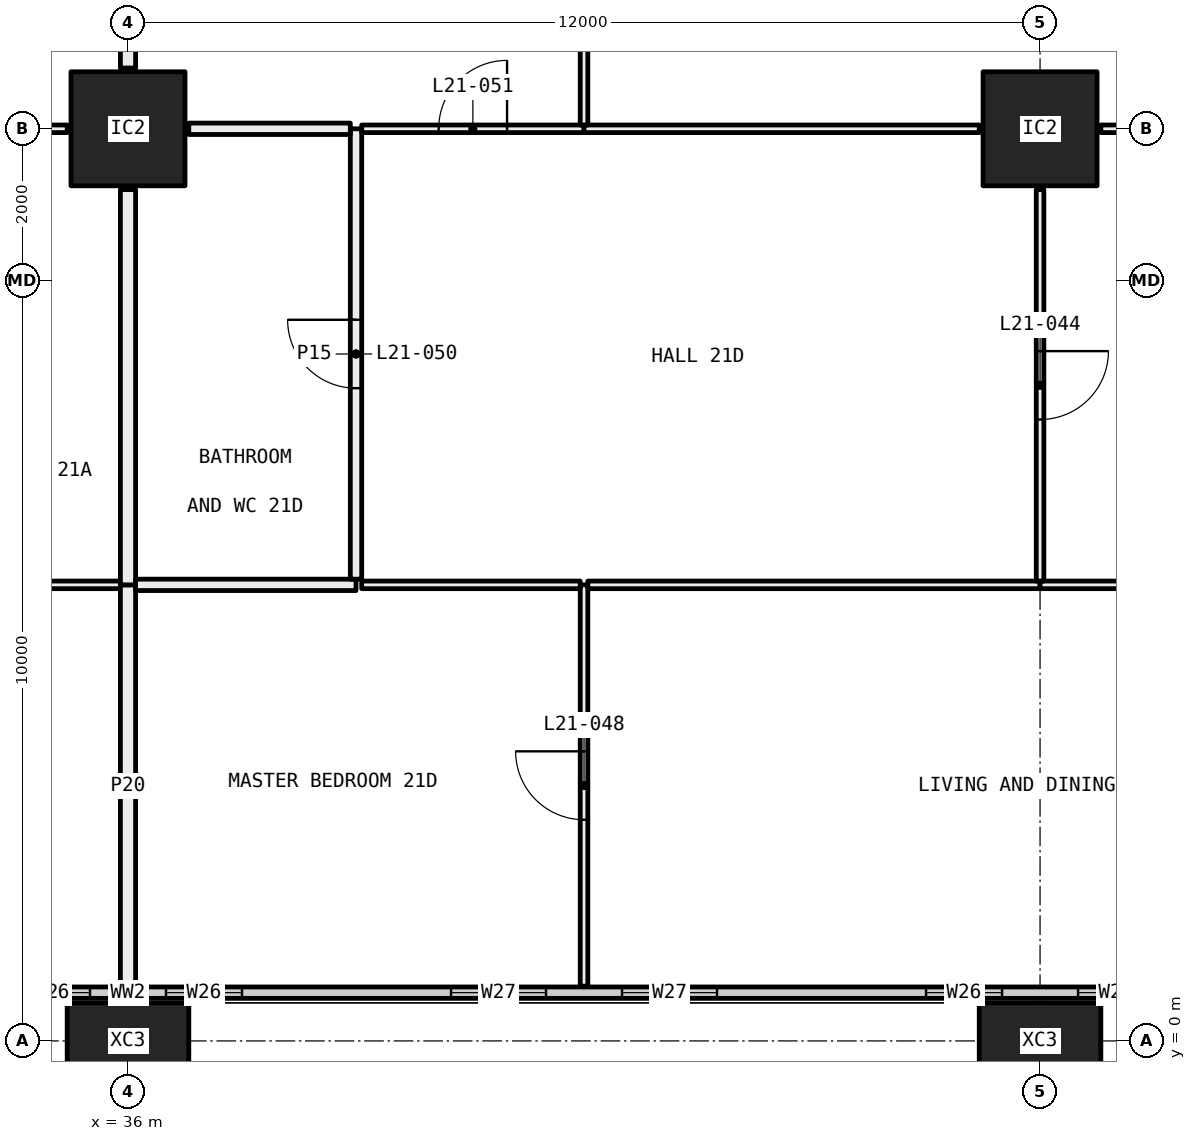
"""IFC4 building model, lengths in metres.
Left out: names, types, materials, properties, quantities, classifications, styles, units other than length and angle.
Written with IfcOpenShell. Run it as: python <this file> out.ifc"""

import sys

from ifc_helpers import new_model, si_unit, direction, frame, frame_2d, origin, origin_2d, place, context, subcontext, project, spatial, rectangle, hollow_rectangle, extrude, element, fill, save


model = new_model("IFC4")
c1 = context("Model", 3, precision=1e-05, world=origin(), true_north=direction((0.0, 1.0)))
c2 = subcontext(c1, "Body", "Model", "MODEL_VIEW")
j1 = project(units=[si_unit("LENGTHUNIT", "METRE"), si_unit("PLANEANGLEUNIT", "RADIAN")], contexts=[c1])
p1 = place(None, origin())
s1 = spatial("IfcSite", under=j1, at=p1, CompositionType="ELEMENT")
p2 = place(p1, origin())
s2 = spatial("IfcBuilding", under=s1, at=p2, CompositionType="ELEMENT")
p3 = place(p2, frame((0.0, 0.0, 85.2)))
s3 = spatial("IfcBuildingStorey", under=s2, at=p3, CompositionType="ELEMENT", Elevation=85.2)
p4 = place(p3, frame((36.0, 0.0, -0.4), z_axis=(0.0, 0.0, 1.0), x_axis=(1.0, 0.0, 0.0)))
e1 = element("IfcColumn", 1, at=p4, inside=s3, PredefinedType="COLUMN", context=c2, shape_type="SweptSolid", body=[
    extrude(hollow_rectangle(XDim=1.6, YDim=1.0, WallThickness=0.065, at=origin_2d()), origin(), (0.0, 0.0, 1.0), 3.45),
])
p5 = place(p3, frame((36.0, 12.0, 0.0), z_axis=(0.0, 0.0, 1.0), x_axis=(1.0, 0.0, 0.0)))
e2 = element("IfcColumn", 2, at=p5, inside=s3, PredefinedType="COLUMN", context=c2, shape_type="SweptSolid", body=[
    extrude(hollow_rectangle(XDim=1.5, YDim=1.5, WallThickness=0.065, at=origin_2d()), origin(), (0.0, 0.0, 1.0), 3.05),
])
p6 = place(p3, frame((48.0, 0.0, -0.4), z_axis=(0.0, 0.0, 1.0), x_axis=(1.0, 0.0, 0.0)))
e3 = element("IfcColumn", 3, at=p6, inside=s3, PredefinedType="COLUMN", context=c2, shape_type="SweptSolid", body=[
    extrude(hollow_rectangle(XDim=1.6, YDim=1.0, WallThickness=0.065, at=origin_2d()), origin(), (0.0, 0.0, 1.0), 3.45),
])
p7 = place(p3, frame((48.0, 12.0, 0.0), z_axis=(0.0, 0.0, 1.0), x_axis=(1.0, 0.0, 0.0)))
e4 = element("IfcColumn", 4, at=p7, inside=s3, PredefinedType="COLUMN", context=c2, shape_type="SweptSolid", body=[
    extrude(hollow_rectangle(XDim=1.5, YDim=1.5, WallThickness=0.065, at=origin_2d()), origin(), (0.0, 0.0, 1.0), 3.05),
])
p8 = place(p3, frame((6.56, 0.635, 0.0), z_axis=(0.0, 0.0, 1.0), x_axis=(1.0, 0.0, 0.0)))
e5 = element("IfcWall", 5, at=p8, inside=s3, PredefinedType="ELEMENTEDWALL", context=c2, shape_type="SweptSolid", body=[
    extrude(rectangle(XDim=58.88, YDim=0.15, at=frame_2d((29.44, 0.0))), origin(), (0.0, 0.0, 1.0), 3.05),
])
p9 = place(p8, frame((0.44, 0.0, 0.45)))
e6 = element("IfcOpeningElement", 6, at=p9, cuts=e5, PredefinedType="OPENING", context=c2, shape_type="SweptSolid", body=[
    extrude(rectangle(XDim=4.5, YDim=2.55, at=frame_2d((2.25, 1.275))), frame((0.0, 0.085, 0.0), z_axis=(0.0, -1.0, 0.0), x_axis=(1.0, 0.0, 0.0)), (0.0, 0.0, 1.0), 0.17),
])
p10 = place(p8, frame((5.94, 0.0, 0.45)))
e7 = element("IfcOpeningElement", 7, at=p10, cuts=e5, PredefinedType="OPENING", context=c2, shape_type="SweptSolid", body=[
    extrude(rectangle(XDim=1.0, YDim=2.55, at=frame_2d((0.5, 1.275))), frame((0.0, 0.085, 0.0), z_axis=(0.0, -1.0, 0.0), x_axis=(1.0, 0.0, 0.0)), (0.0, 0.0, 1.0), 0.17),
])
p11 = place(p8, frame((9.69, 0.0, 0.45)))
e8 = element("IfcOpeningElement", 8, at=p11, cuts=e5, PredefinedType="OPENING", context=c2, shape_type="SweptSolid", body=[
    extrude(rectangle(XDim=1.25, YDim=2.55, at=frame_2d((0.625, 1.275))), frame((0.0, 0.085, 0.0), z_axis=(0.0, -1.0, 0.0), x_axis=(1.0, 0.0, 0.0)), (0.0, 0.0, 1.0), 0.17),
])
p12 = place(p8, frame((11.94, 0.0, 0.45)))
e9 = element("IfcOpeningElement", 9, at=p12, cuts=e5, PredefinedType="OPENING", context=c2, shape_type="SweptSolid", body=[
    extrude(rectangle(XDim=1.25, YDim=2.55, at=frame_2d((0.625, 1.275))), frame((0.0, 0.085, 0.0), z_axis=(0.0, -1.0, 0.0), x_axis=(1.0, 0.0, 0.0)), (0.0, 0.0, 1.0), 0.17),
])
p13 = place(p8, frame((15.94, 0.0, 0.45)))
e10 = element("IfcOpeningElement", 10, at=p13, cuts=e5, PredefinedType="OPENING", context=c2, shape_type="SweptSolid", body=[
    extrude(rectangle(XDim=1.0, YDim=2.55, at=frame_2d((0.5, 1.275))), frame((0.0, 0.085, 0.0), z_axis=(0.0, -1.0, 0.0), x_axis=(1.0, 0.0, 0.0)), (0.0, 0.0, 1.0), 0.17),
])
p14 = place(p8, frame((17.94, 0.0, 0.45)))
e11 = element("IfcOpeningElement", 11, at=p14, cuts=e5, PredefinedType="OPENING", context=c2, shape_type="SweptSolid", body=[
    extrude(rectangle(XDim=1.0, YDim=2.55, at=frame_2d((0.5, 1.275))), frame((0.0, 0.085, 0.0), z_axis=(0.0, -1.0, 0.0), x_axis=(1.0, 0.0, 0.0)), (0.0, 0.0, 1.0), 0.17),
])
p15 = place(p8, frame((21.69, 0.0, 0.45)))
e12 = element("IfcOpeningElement", 12, at=p15, cuts=e5, PredefinedType="OPENING", context=c2, shape_type="SweptSolid", body=[
    extrude(rectangle(XDim=1.25, YDim=2.55, at=frame_2d((0.625, 1.275))), frame((0.0, 0.085, 0.0), z_axis=(0.0, -1.0, 0.0), x_axis=(1.0, 0.0, 0.0)), (0.0, 0.0, 1.0), 0.17),
])
p16 = place(p8, frame((23.94, 0.0, 0.45)))
e13 = element("IfcOpeningElement", 13, at=p16, cuts=e5, PredefinedType="OPENING", context=c2, shape_type="SweptSolid", body=[
    extrude(rectangle(XDim=1.25, YDim=2.55, at=frame_2d((0.625, 1.275))), frame((0.0, 0.085, 0.0), z_axis=(0.0, -1.0, 0.0), x_axis=(1.0, 0.0, 0.0)), (0.0, 0.0, 1.0), 0.17),
])
p17 = place(p8, frame((27.94, 0.0, 0.45)))
e14 = element("IfcOpeningElement", 14, at=p17, cuts=e5, PredefinedType="OPENING", context=c2, shape_type="SweptSolid", body=[
    extrude(rectangle(XDim=1.0, YDim=2.55, at=frame_2d((0.5, 1.275))), frame((0.0, 0.085, 0.0), z_axis=(0.0, -1.0, 0.0), x_axis=(1.0, 0.0, 0.0)), (0.0, 0.0, 1.0), 0.17),
])
p18 = place(p8, frame((29.94, 0.0, 0.45)))
e15 = element("IfcOpeningElement", 15, at=p18, cuts=e5, PredefinedType="OPENING", context=c2, shape_type="SweptSolid", body=[
    extrude(rectangle(XDim=1.0, YDim=2.55, at=frame_2d((0.5, 1.275))), frame((0.0, 0.085, 0.0), z_axis=(0.0, -1.0, 0.0), x_axis=(1.0, 0.0, 0.0)), (0.0, 0.0, 1.0), 0.17),
])
p19 = place(p8, frame((33.69, 0.0, 0.45)))
e16 = element("IfcOpeningElement", 16, at=p19, cuts=e5, PredefinedType="OPENING", context=c2, shape_type="SweptSolid", body=[
    extrude(rectangle(XDim=1.25, YDim=2.55, at=frame_2d((0.625, 1.275))), frame((0.0, 0.085, 0.0), z_axis=(0.0, -1.0, 0.0), x_axis=(1.0, 0.0, 0.0)), (0.0, 0.0, 1.0), 0.17),
])
p20 = place(p8, frame((35.94, 0.0, 0.45)))
e17 = element("IfcOpeningElement", 17, at=p20, cuts=e5, PredefinedType="OPENING", context=c2, shape_type="SweptSolid", body=[
    extrude(rectangle(XDim=1.25, YDim=2.55, at=frame_2d((0.625, 1.275))), frame((0.0, 0.085, 0.0), z_axis=(0.0, -1.0, 0.0), x_axis=(1.0, 0.0, 0.0)), (0.0, 0.0, 1.0), 0.17),
])
p21 = place(p8, frame((39.94, 0.0, 0.45)))
e18 = element("IfcOpeningElement", 18, at=p21, cuts=e5, PredefinedType="OPENING", context=c2, shape_type="SweptSolid", body=[
    extrude(rectangle(XDim=1.0, YDim=2.55, at=frame_2d((0.5, 1.275))), frame((0.0, 0.085, 0.0), z_axis=(0.0, -1.0, 0.0), x_axis=(1.0, 0.0, 0.0)), (0.0, 0.0, 1.0), 0.17),
])
p22 = place(p8, frame((41.94, 0.0, 0.45)))
e19 = element("IfcOpeningElement", 19, at=p22, cuts=e5, PredefinedType="OPENING", context=c2, shape_type="SweptSolid", body=[
    extrude(rectangle(XDim=1.0, YDim=2.55, at=frame_2d((0.5, 1.275))), frame((0.0, 0.085, 0.0), z_axis=(0.0, -1.0, 0.0), x_axis=(1.0, 0.0, 0.0)), (0.0, 0.0, 1.0), 0.17),
])
p23 = place(p8, frame((45.69, 0.0, 0.45)))
e20 = element("IfcOpeningElement", 20, at=p23, cuts=e5, PredefinedType="OPENING", context=c2, shape_type="SweptSolid", body=[
    extrude(rectangle(XDim=1.25, YDim=2.55, at=frame_2d((0.625, 1.275))), frame((0.0, 0.085, 0.0), z_axis=(0.0, -1.0, 0.0), x_axis=(1.0, 0.0, 0.0)), (0.0, 0.0, 1.0), 0.17),
])
p24 = place(p8, frame((47.94, 0.0, 0.45)))
e21 = element("IfcOpeningElement", 21, at=p24, cuts=e5, PredefinedType="OPENING", context=c2, shape_type="SweptSolid", body=[
    extrude(rectangle(XDim=1.25, YDim=2.55, at=frame_2d((0.625, 1.275))), frame((0.0, 0.085, 0.0), z_axis=(0.0, -1.0, 0.0), x_axis=(1.0, 0.0, 0.0)), (0.0, 0.0, 1.0), 0.17),
])
p25 = place(p8, frame((51.94, 0.0, 0.45)))
e22 = element("IfcOpeningElement", 22, at=p25, cuts=e5, PredefinedType="OPENING", context=c2, shape_type="SweptSolid", body=[
    extrude(rectangle(XDim=1.0, YDim=2.55, at=frame_2d((0.5, 1.275))), frame((0.0, 0.085, 0.0), z_axis=(0.0, -1.0, 0.0), x_axis=(1.0, 0.0, 0.0)), (0.0, 0.0, 1.0), 0.17),
])
p26 = place(p8, frame((53.94, 0.0, 0.45)))
e23 = element("IfcOpeningElement", 23, at=p26, cuts=e5, PredefinedType="OPENING", context=c2, shape_type="SweptSolid", body=[
    extrude(rectangle(XDim=4.5, YDim=2.55, at=frame_2d((2.25, 1.275))), frame((0.0, 0.085, 0.0), z_axis=(0.0, -1.0, 0.0), x_axis=(1.0, 0.0, 0.0)), (0.0, 0.0, 1.0), 0.17),
])
p27 = place(p3, frame((35.9, 6.0, 0.0), z_axis=(0.0, 0.0, 1.0), x_axis=(-1.0, 0.0, 0.0)))
e24 = element("IfcWall", 24, at=p27, inside=s3, PredefinedType="PARTITIONING", context=c2, shape_type="SweptSolid", body=[
    extrude(rectangle(XDim=2.9, YDim=0.1, at=frame_2d((1.45, 0.0))), origin(), (0.0, 0.0, 1.0), 3.05),
])
p28 = place(p3, frame((36.0, 0.72, 0.0), z_axis=(0.0, 0.0, 1.0), x_axis=(0.0, 1.0, 0.0)))
e25 = element("IfcWall", 25, at=p28, inside=s3, PredefinedType="PARTITIONING", context=c2, shape_type="SweptSolid", body=[
    extrude(rectangle(XDim=5.28, YDim=0.2, at=frame_2d((2.64, 0.0))), origin(), (0.0, 0.0, 1.0), 2.45),
])
p29 = place(p3, frame((35.2, 12.0, 0.0), z_axis=(0.0, 0.0, 1.0), x_axis=(-1.0, 0.0, 0.0)))
e26 = element("IfcWall", 26, at=p29, inside=s3, PredefinedType="PARTITIONING", context=c2, shape_type="SweptSolid", body=[
    extrude(rectangle(XDim=2.15, YDim=0.1, at=frame_2d((1.075, 0.0))), origin(), (0.0, 0.0, 1.0), 2.45),
])
for number, where, z_axis, x_axis in (
    (27, (36.0, 6.0, 0.0), (0.0, 0.0, 1.0), (0.0, 1.0, 0.0)),
    (28, (36.0, 12.8, 0.0), (0.0, 0.0, 1.0), (0.0, 1.0, 0.0)),
):
    element("IfcWall", number, at=place(p3, frame(where, z_axis=z_axis, x_axis=x_axis)), inside=s3, PredefinedType="PARTITIONING", context=c2, shape_type="SweptSolid", body=[
        extrude(rectangle(XDim=5.2, YDim=0.2, at=frame_2d((2.6, 0.0))), origin(), (0.0, 0.0, 1.0), 2.45),
    ])
p30 = place(p3, frame((42.0, 0.72, 0.0), z_axis=(0.0, 0.0, 1.0), x_axis=(0.0, 1.0, 0.0)))
e29 = element("IfcWall", 29, at=p30, inside=s3, PredefinedType="PARTITIONING", context=c2, shape_type="SweptSolid", body=[
    extrude(rectangle(XDim=5.28, YDim=0.1, at=frame_2d((2.64, 0.0))), origin(), (0.0, 0.0, 1.0), 3.05),
])
p31 = place(p30, frame((2.19, 0.0, 0.0)))
e30 = element("IfcOpeningElement", 30, at=p31, cuts=e29, PredefinedType="OPENING", context=c2, shape_type="SweptSolid", body=[
    extrude(rectangle(XDim=0.9, YDim=2.1, at=frame_2d((0.45, 1.05))), frame((0.0, 0.06, 0.0), z_axis=(0.0, -1.0, 0.0), x_axis=(1.0, 0.0, 0.0)), (0.0, 0.0, 1.0), 0.12),
])
p32 = place(p3, frame((39.0, 6.0, 0.0), z_axis=(0.0, 0.0, 1.0), x_axis=(-1.0, 0.0, 0.0)))
e31 = element("IfcWall", 31, at=p32, inside=s3, PredefinedType="PARTITIONING", context=c2, shape_type="SweptSolid", body=[
    extrude(rectangle(XDim=2.9, YDim=0.15, at=frame_2d((1.45, 0.0))), origin(), (0.0, 0.0, 1.0), 3.05),
])
p33 = place(p3, frame((41.95, 6.0, 0.0), z_axis=(0.0, 0.0, 1.0), x_axis=(-1.0, 0.0, 0.0)))
e32 = element("IfcWall", 32, at=p33, inside=s3, PredefinedType="PARTITIONING", context=c2, shape_type="SweptSolid", body=[
    extrude(rectangle(XDim=2.875, YDim=0.1, at=frame_2d((1.438, 0.0))), origin(), (0.0, 0.0, 1.0), 3.05),
])
p34 = place(p3, frame((48.0, 6.0, 0.0), z_axis=(0.0, 0.0, 1.0), x_axis=(-1.0, 0.0, 0.0)))
e33 = element("IfcWall", 33, at=p34, inside=s3, PredefinedType="PARTITIONING", context=c2, shape_type="SweptSolid", body=[
    extrude(rectangle(XDim=5.95, YDim=0.1, at=frame_2d((2.975, 0.0))), origin(), (0.0, 0.0, 1.0), 2.45),
])
p35 = place(p3, frame((53.95, 6.0, 0.0), z_axis=(0.0, 0.0, 1.0), x_axis=(-1.0, 0.0, 0.0)))
e34 = element("IfcWall", 34, at=p35, inside=s3, PredefinedType="PARTITIONING", context=c2, shape_type="SweptSolid", body=[
    extrude(rectangle(XDim=5.95, YDim=0.1, at=frame_2d((2.975, 0.0))), origin(), (0.0, 0.0, 1.0), 2.45),
])
p36 = place(p35, frame((2.525, 0.0, 0.0)))
e35 = element("IfcOpeningElement", 35, at=p36, cuts=e34, PredefinedType="OPENING", context=c2, shape_type="SweptSolid", body=[
    extrude(rectangle(XDim=0.9, YDim=2.1, at=frame_2d((0.45, 1.05))), frame((0.0, 0.06, 0.0), z_axis=(0.0, -1.0, 0.0), x_axis=(1.0, 0.0, 0.0)), (0.0, 0.0, 1.0), 0.12),
])
p37 = place(p3, frame((39.0, 6.075, 0.0), z_axis=(0.0, 0.0, 1.0), x_axis=(0.0, 1.0, 0.0)))
e36 = element("IfcWall", 36, at=p37, inside=s3, PredefinedType="PARTITIONING", context=c2, shape_type="SweptSolid", body=[
    extrude(rectangle(XDim=5.925, YDim=0.15, at=frame_2d((2.962, 0.0))), origin(), (0.0, 0.0, 1.0), 2.45),
])
p38 = place(p37, frame((2.512, 0.0, 0.0)))
e37 = element("IfcOpeningElement", 37, at=p38, cuts=e36, PredefinedType="OPENING", context=c2, shape_type="SweptSolid", body=[
    extrude(rectangle(XDim=0.9, YDim=2.1, at=frame_2d((0.45, 1.05))), frame((0.0, 0.085, 0.0), z_axis=(0.0, -1.0, 0.0), x_axis=(1.0, 0.0, 0.0)), (0.0, 0.0, 1.0), 0.17),
])
p39 = place(p3, frame((38.925, 12.0, 0.0), z_axis=(0.0, 0.0, 1.0), x_axis=(-1.0, 0.0, 0.0)))
e38 = element("IfcWall", 38, at=p39, inside=s3, PredefinedType="PARTITIONING", context=c2, shape_type="SweptSolid", body=[
    extrude(rectangle(XDim=2.125, YDim=0.15, at=frame_2d((1.062, 0.0))), origin(), (0.0, 0.0, 1.0), 2.45),
])
p40 = place(p3, frame((48.0, 6.05, 0.0), z_axis=(0.0, 0.0, 1.0), x_axis=(0.0, 1.0, 0.0)))
e39 = element("IfcWall", 39, at=p40, inside=s3, PredefinedType="PARTITIONING", context=c2, shape_type="SweptSolid", body=[
    extrude(rectangle(XDim=5.15, YDim=0.1, at=frame_2d((2.575, 0.0))), origin(), (0.0, 0.0, 1.0), 2.45),
])
p41 = place(p40, frame((2.125, 0.0, 0.0)))
e40 = element("IfcOpeningElement", 40, at=p41, cuts=e39, PredefinedType="OPENING", context=c2, shape_type="SweptSolid", body=[
    extrude(rectangle(XDim=0.9, YDim=2.1, at=frame_2d((0.45, 1.05))), frame((0.0, 0.06, 0.0), z_axis=(0.0, -1.0, 0.0), x_axis=(1.0, 0.0, 0.0)), (0.0, 0.0, 1.0), 0.12),
])
p42 = place(p3, frame((42.0, 12.0, 0.0), z_axis=(0.0, 0.0, 1.0), x_axis=(-1.0, 0.0, 0.0)))
e41 = element("IfcWall", 41, at=p42, inside=s3, PredefinedType="PARTITIONING", context=c2, shape_type="SweptSolid", body=[
    extrude(rectangle(XDim=2.925, YDim=0.1, at=frame_2d((1.462, 0.0))), origin(), (0.0, 0.0, 1.0), 2.45),
])
p43 = place(p42, frame((1.012, 0.0, 0.0)))
e42 = element("IfcOpeningElement", 42, at=p43, cuts=e41, PredefinedType="OPENING", context=c2, shape_type="SweptSolid", body=[
    extrude(rectangle(XDim=0.9, YDim=2.1, at=frame_2d((0.45, 1.05))), frame((0.0, 0.06, 0.0), z_axis=(0.0, -1.0, 0.0), x_axis=(1.0, 0.0, 0.0)), (0.0, 0.0, 1.0), 0.12),
])
p44 = place(p3, frame((47.2, 12.0, 0.0), z_axis=(0.0, 0.0, 1.0), x_axis=(-1.0, 0.0, 0.0)))
e43 = element("IfcWall", 43, at=p44, inside=s3, PredefinedType="PARTITIONING", context=c2, shape_type="SweptSolid", body=[
    extrude(rectangle(XDim=5.2, YDim=0.1, at=frame_2d((2.6, 0.0))), origin(), (0.0, 0.0, 1.0), 2.45),
])
p45 = place(p3, frame((49.5, 12.0, 0.0), z_axis=(0.0, 0.0, 1.0), x_axis=(-1.0, 0.0, 0.0)))
e44 = element("IfcWall", 44, at=p45, inside=s3, PredefinedType="PARTITIONING", context=c2, shape_type="SweptSolid", body=[
    extrude(rectangle(XDim=0.7, YDim=0.1, at=frame_2d((0.35, 0.0))), origin(), (0.0, 0.0, 1.0), 2.45),
])
p46 = place(p3, frame((42.0, 12.05, 0.0), z_axis=(0.0, 0.0, 1.0), x_axis=(0.0, 1.0, 0.0)))
e45 = element("IfcWall", 45, at=p46, inside=s3, PredefinedType="PARTITIONING", context=c2, shape_type="SweptSolid", body=[
    extrude(rectangle(XDim=5.95, YDim=0.1, at=frame_2d((2.975, 0.0))), origin(), (0.0, 0.0, 1.0), 2.45),
])
p47 = place(p17, origin())
e46 = element("IfcWindow", 46, at=p47, inside=s3, PartitioningType="SINGLE_PANEL", PredefinedType="WINDOW", context=c2, shape_type="SweptSolid", body=[
    extrude(rectangle(XDim=1.0, YDim=2.55, at=frame_2d((0.5, 1.275))), frame((0.0, 0.03, 0.0), z_axis=(0.0, -1.0, 0.0), x_axis=(1.0, 0.0, 0.0)), (0.0, 0.0, 1.0), 0.06),
])
fill(e14, e46)
p48 = place(p18, origin())
e47 = element("IfcWindow", 47, at=p48, inside=s3, PartitioningType="SINGLE_PANEL", PredefinedType="WINDOW", context=c2, shape_type="SweptSolid", body=[
    extrude(rectangle(XDim=1.0, YDim=2.55, at=frame_2d((0.5, 1.275))), frame((0.0, 0.03, 0.0), z_axis=(0.0, -1.0, 0.0), x_axis=(1.0, 0.0, 0.0)), (0.0, 0.0, 1.0), 0.06),
])
fill(e15, e47)
p49 = place(p19, origin())
e48 = element("IfcWindow", 48, at=p49, inside=s3, PartitioningType="SINGLE_PANEL", PredefinedType="WINDOW", context=c2, shape_type="SweptSolid", body=[
    extrude(rectangle(XDim=1.25, YDim=2.55, at=frame_2d((0.625, 1.275))), frame((0.0, 0.03, 0.0), z_axis=(0.0, -1.0, 0.0), x_axis=(1.0, 0.0, 0.0)), (0.0, 0.0, 1.0), 0.06),
])
fill(e16, e48)
p50 = place(p20, origin())
e49 = element("IfcWindow", 49, at=p50, inside=s3, PartitioningType="SINGLE_PANEL", PredefinedType="WINDOW", context=c2, shape_type="SweptSolid", body=[
    extrude(rectangle(XDim=1.25, YDim=2.55, at=frame_2d((0.625, 1.275))), frame((0.0, 0.03, 0.0), z_axis=(0.0, -1.0, 0.0), x_axis=(1.0, 0.0, 0.0)), (0.0, 0.0, 1.0), 0.06),
])
fill(e17, e49)
p51 = place(p21, origin())
e50 = element("IfcWindow", 50, at=p51, inside=s3, PartitioningType="SINGLE_PANEL", PredefinedType="WINDOW", context=c2, shape_type="SweptSolid", body=[
    extrude(rectangle(XDim=1.0, YDim=2.55, at=frame_2d((0.5, 1.275))), frame((0.0, 0.03, 0.0), z_axis=(0.0, -1.0, 0.0), x_axis=(1.0, 0.0, 0.0)), (0.0, 0.0, 1.0), 0.06),
])
fill(e18, e50)
p52 = place(p22, origin())
e51 = element("IfcWindow", 51, at=p52, inside=s3, PartitioningType="SINGLE_PANEL", PredefinedType="WINDOW", context=c2, shape_type="SweptSolid", body=[
    extrude(rectangle(XDim=1.0, YDim=2.55, at=frame_2d((0.5, 1.275))), frame((0.0, 0.03, 0.0), z_axis=(0.0, -1.0, 0.0), x_axis=(1.0, 0.0, 0.0)), (0.0, 0.0, 1.0), 0.06),
])
fill(e19, e51)
p53 = place(p41, frame((0.9, 0.0, 0.0), x_axis=(-1.0, 0.0, 0.0)))
e52 = element("IfcDoor", 52, at=p53, inside=s3, OperationType="SINGLE_SWING_RIGHT", PredefinedType="DOOR", context=c2, shape_type="SweptSolid", body=[
    extrude(rectangle(XDim=0.9, YDim=2.1, at=frame_2d((0.45, 1.05))), frame((0.0, 0.025, 0.0), z_axis=(0.0, -1.0, 0.0), x_axis=(1.0, 0.0, 0.0)), (0.0, 0.0, 1.0), 0.05),
])
fill(e40, e52)
p54 = place(p31, origin())
e53 = element("IfcDoor", 53, at=p54, inside=s3, OperationType="SINGLE_SWING_LEFT", PredefinedType="DOOR", context=c2, shape_type="SweptSolid", body=[
    extrude(rectangle(XDim=0.9, YDim=2.1, at=frame_2d((0.45, 1.05))), frame((0.0, 0.025, 0.0), z_axis=(0.0, -1.0, 0.0), x_axis=(1.0, 0.0, 0.0)), (0.0, 0.0, 1.0), 0.05),
])
fill(e30, e53)
p55 = place(p38, origin())
e54 = element("IfcDoor", 54, at=p55, inside=s3, OperationType="SINGLE_SWING_LEFT", PredefinedType="DOOR", context=c2, shape_type="SweptSolid", body=[
    extrude(rectangle(XDim=0.9, YDim=2.1, at=frame_2d((0.45, 1.05))), frame((0.0, 0.025, 0.0), z_axis=(0.0, -1.0, 0.0), x_axis=(1.0, 0.0, 0.0)), (0.0, 0.0, 1.0), 0.05),
])
fill(e37, e54)
p56 = place(p43, frame((0.9, 0.0, 0.0), x_axis=(-1.0, 0.0, 0.0)))
e55 = element("IfcDoor", 55, at=p56, inside=s3, OperationType="SINGLE_SWING_LEFT", PredefinedType="DOOR", context=c2, shape_type="SweptSolid", body=[
    extrude(rectangle(XDim=0.9, YDim=2.1, at=frame_2d((0.45, 1.05))), frame((0.0, 0.025, 0.0), z_axis=(0.0, -1.0, 0.0), x_axis=(1.0, 0.0, 0.0)), (0.0, 0.0, 1.0), 0.05),
])
fill(e42, e55)
save(model, sys.argv[1])
